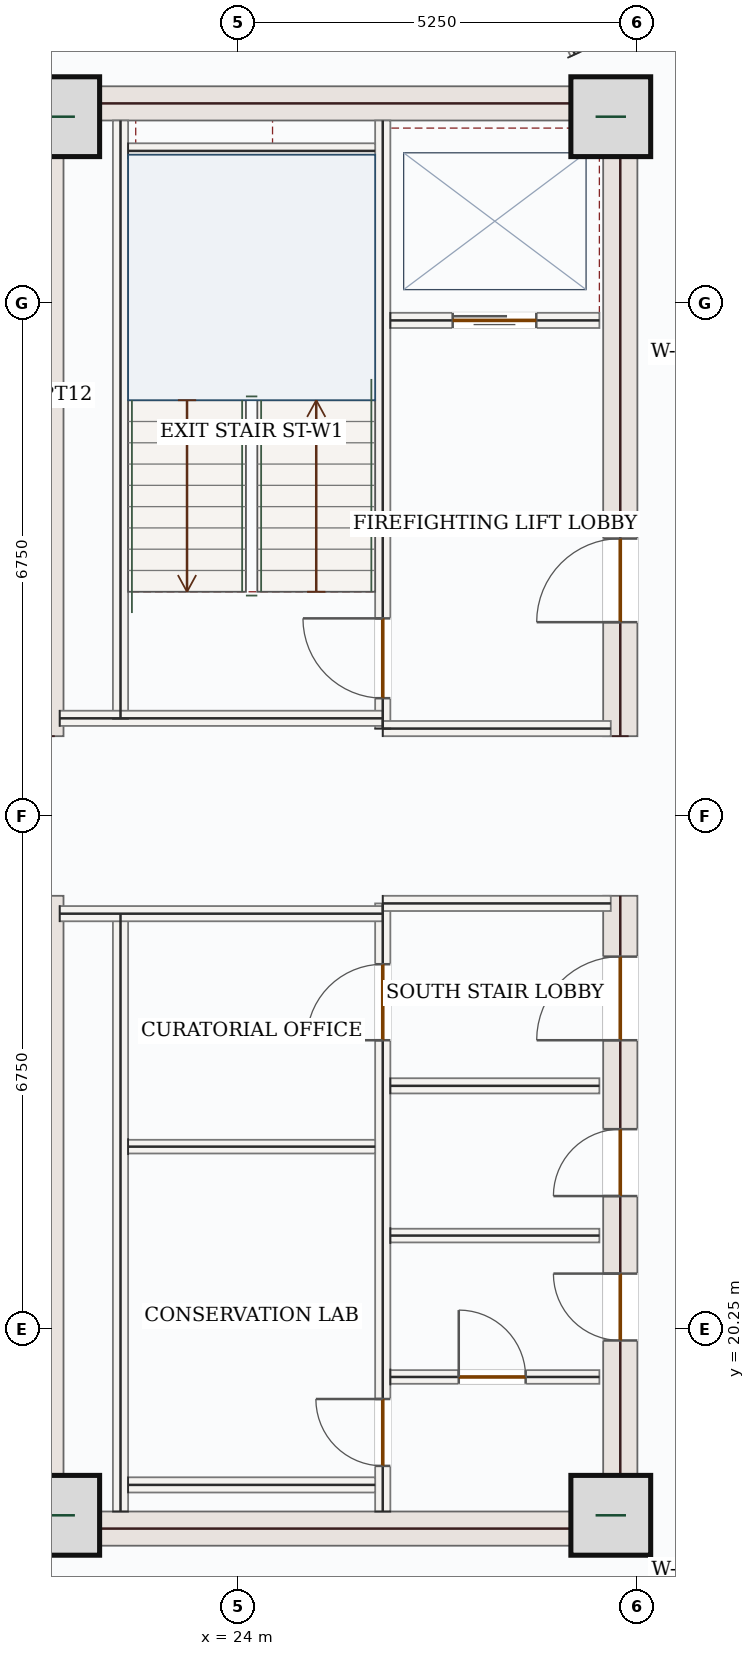
"""IFC4 building model, lengths in metres.
Left out: names, types, materials, properties, quantities, classifications, styles, units other than length and angle.
Written with IfcOpenShell. Run it as: python <this file> out.ifc"""

import sys

from ifc_helpers import new_model, si_unit, direction, frame, frame_2d, origin, origin_2d, place, context, subcontext, project, spatial, rectangle, extrude, source, transform, mapped, element, fill, save


model = new_model("IFC4")
c1 = context("Model", 3, precision=1e-05, world=origin(), true_north=direction((0.0, 1.0)))
c2 = subcontext(c1, "Body", "Model", "MODEL_VIEW")
j1 = project(units=[si_unit("LENGTHUNIT", "METRE"), si_unit("PLANEANGLEUNIT", "RADIAN")], contexts=[c1])
p1 = place(None, origin())
s1 = spatial("IfcSite", under=j1, at=p1, CompositionType="ELEMENT")
p2 = place(p1, origin())
s2 = spatial("IfcBuilding", under=s1, at=p2, CompositionType="ELEMENT")
p3 = place(p2, frame((0.0, 0.0, 239.1)))
s3 = spatial("IfcBuildingStorey", under=s2, at=p3, CompositionType="ELEMENT", Elevation=239.1)
m1 = source(origin(), c2, "Body", "SweptSolid", [
    extrude(rectangle(XDim=8.55, YDim=0.45, at=frame_2d((4.275, 0.0))), origin(), (0.0, 0.0, 1.0), 3.5),
])
for number, where, z_axis, x_axis in (
    (1, (21.475, 17.4, 0.0), (0.0, 0.0, 1.0), (0.0, 1.0, 0.0)),
    (2, (21.475, 28.05, 0.0), (0.0, 0.0, 1.0), (0.0, 1.0, 0.0)),
):
    element("IfcWall", number, at=place(p3, frame(where, z_axis=z_axis, x_axis=x_axis)), inside=s3, PredefinedType="SHEAR", context=c2, shape_type="MappedRepresentation", body=[
        mapped(m1, transform((0.0, 0.0, 0.0), x_axis=(1.0, 0.0, 0.0), y_axis=(0.0, 1.0, 0.0), z_axis=(0.0, 0.0, 1.0), scale=1.0)),
    ])
p4 = place(p3, frame((29.025, 17.4, 0.0), z_axis=(0.0, 0.0, 1.0), x_axis=(0.0, 1.0, 0.0)))
e3 = element("IfcWall", 3, at=p4, inside=s3, PredefinedType="SHEAR", context=c2, shape_type="SweptSolid", body=[
    extrude(rectangle(XDim=8.55, YDim=0.45, at=frame_2d((4.275, 0.0))), origin(), (0.0, 0.0, 1.0), 3.5),
])
p5 = place(p4, frame((6.65, 0.0, 0.0)))
e4 = element("IfcOpeningElement", 4, at=p5, cuts=e3, PredefinedType="OPENING", context=c2, shape_type="SweptSolid", body=[
    extrude(rectangle(XDim=1.1, YDim=2.2, at=frame_2d((0.55, 1.1))), frame((0.0, 0.235, 0.0), z_axis=(0.0, -1.0, 0.0), x_axis=(1.0, 0.0, 0.0)), (0.0, 0.0, 1.0), 0.47),
])
p6 = place(p4, frame((2.7, 0.0, 0.0)))
e5 = element("IfcOpeningElement", 5, at=p6, cuts=e3, PredefinedType="OPENING", context=c2, shape_type="SweptSolid", body=[
    extrude(rectangle(XDim=0.88, YDim=2.1, at=frame_2d((0.44, 1.05))), frame((0.0, 0.235, 0.0), z_axis=(0.0, -1.0, 0.0), x_axis=(1.0, 0.0, 0.0)), (0.0, 0.0, 1.0), 0.47),
])
p7 = place(p4, frame((4.6, 0.0, 0.0)))
e6 = element("IfcOpeningElement", 6, at=p7, cuts=e3, PredefinedType="OPENING", context=c2, shape_type="SweptSolid", body=[
    extrude(rectangle(XDim=0.88, YDim=2.1, at=frame_2d((0.44, 1.05))), frame((0.0, 0.235, 0.0), z_axis=(0.0, -1.0, 0.0), x_axis=(1.0, 0.0, 0.0)), (0.0, 0.0, 1.0), 0.47),
])
p8 = place(p3, frame((29.025, 28.05, 0.0), z_axis=(0.0, 0.0, 1.0), x_axis=(0.0, 1.0, 0.0)))
e7 = element("IfcWall", 7, at=p8, inside=s3, PredefinedType="SHEAR", context=c2, shape_type="SweptSolid", body=[
    extrude(rectangle(XDim=8.55, YDim=0.45, at=frame_2d((4.275, 0.0))), origin(), (0.0, 0.0, 1.0), 3.5),
])
p9 = place(p8, frame((1.5, 0.0, 0.0)))
e8 = element("IfcOpeningElement", 8, at=p9, cuts=e7, PredefinedType="OPENING", context=c2, shape_type="SweptSolid", body=[
    extrude(rectangle(XDim=1.1, YDim=2.2, at=frame_2d((0.55, 1.1))), frame((0.0, 0.235, 0.0), z_axis=(0.0, -1.0, 0.0), x_axis=(1.0, 0.0, 0.0)), (0.0, 0.0, 1.0), 0.47),
])
m2 = source(origin(), c2, "Body", "SweptSolid", [
    extrude(rectangle(XDim=7.1, YDim=0.45, at=frame_2d((3.55, 0.0))), origin(), (0.0, 0.0, 1.0), 3.5),
])
for number, where, z_axis, x_axis in (
    (9, (21.7, 17.625, 0.0), (0.0, 0.0, 1.0), (1.0, 0.0, 0.0)),
    (10, (21.7, 36.375, 0.0), (0.0, 0.0, 1.0), (1.0, 0.0, 0.0)),
):
    element("IfcWall", number, at=place(p3, frame(where, z_axis=z_axis, x_axis=x_axis)), inside=s3, PredefinedType="SHEAR", context=c2, shape_type="MappedRepresentation", body=[
        mapped(m2, transform((0.0, 0.0, 0.0), x_axis=(1.0, 0.0, 0.0), y_axis=(0.0, 1.0, 0.0), z_axis=(0.0, 0.0, 1.0), scale=1.0)),
    ])
m3 = source(origin(), c2, "Body", "SweptSolid", [
    extrude(rectangle(XDim=1.05, YDim=1.05, at=origin_2d()), origin(), (0.0, 0.0, 1.0), 3.75),
])
for number, where, z_axis, x_axis in (
    (11, (21.65, 17.8, 0.0), (0.0, 0.0, 1.0), (1.0, 0.0, 0.0)),
    (12, (28.9, 17.8, 0.0), (0.0, 0.0, 1.0), (1.0, 0.0, 0.0)),
    (13, (21.65, 36.2, 0.0), (0.0, 0.0, 1.0), (1.0, 0.0, 0.0)),
    (14, (28.9, 36.2, 0.0), (0.0, 0.0, 1.0), (1.0, 0.0, 0.0)),
):
    element("IfcColumn", number, at=place(p3, frame(where, z_axis=z_axis, x_axis=x_axis)), inside=s3, PredefinedType="COLUMN", context=c2, shape_type="MappedRepresentation", body=[
        mapped(m3, transform((0.0, 0.0, 0.0), x_axis=(1.0, 0.0, 0.0), y_axis=(0.0, 1.0, 0.0), z_axis=(0.0, 0.0, 1.0), scale=1.0)),
    ])
m4 = source(origin(), c2, "Body", "SweptSolid", [
    extrude(rectangle(XDim=5.258, YDim=0.28, at=frame_2d((2.629, 0.0))), origin(), (0.0, 0.0, 1.0), 3.5),
])
p10 = place(p3, frame((18.94, 35.542, 0.0), z_axis=(0.0, 0.0, 1.0), x_axis=(0.707106781187, 0.707106781187, 0.0)))
e15 = element("IfcWall", 15, at=p10, inside=s3, PredefinedType="SOLIDWALL", context=c2, shape_type="MappedRepresentation", body=[
    mapped(m4, transform((0.0, 0.0, 0.0), x_axis=(1.0, 0.0, 0.0), y_axis=(0.0, 1.0, 0.0), z_axis=(0.0, 0.0, 1.0), scale=1.0)),
])
m5 = source(origin(), c2, "Body", "SweptSolid", [
    extrude(rectangle(XDim=7.87, YDim=0.2, at=frame_2d((3.935, 0.0))), origin(), (0.0, 0.0, 1.0), 3.5),
])
for number, where, z_axis, x_axis in (
    (16, (22.45, 17.85, 0.0), (0.0, 0.0, 1.0), (0.0, 1.0, 0.0)),
    (17, (22.45, 28.28, 0.0), (0.0, 0.0, 1.0), (0.0, 1.0, 0.0)),
):
    element("IfcWall", number, at=place(p3, frame(where, z_axis=z_axis, x_axis=x_axis)), inside=s3, PredefinedType="SOLIDWALL", context=c2, shape_type="MappedRepresentation", body=[
        mapped(m5, transform((0.0, 0.0, 0.0), x_axis=(1.0, 0.0, 0.0), y_axis=(0.0, 1.0, 0.0), z_axis=(0.0, 0.0, 1.0), scale=1.0)),
    ])
p11 = place(p3, frame((25.9, 17.85, 0.0), z_axis=(0.0, 0.0, 1.0), x_axis=(0.0, 1.0, 0.0)))
e18 = element("IfcWall", 18, at=p11, inside=s3, PredefinedType="SOLIDWALL", context=c2, shape_type="SweptSolid", body=[
    extrude(rectangle(XDim=8.0, YDim=0.2, at=frame_2d((4.0, 0.0))), origin(), (0.0, 0.0, 1.0), 3.5),
])
p12 = place(p11, frame((6.2, 0.0, 0.0)))
e19 = element("IfcOpeningElement", 19, at=p12, cuts=e18, PredefinedType="OPENING", context=c2, shape_type="SweptSolid", body=[
    extrude(rectangle(XDim=1.0, YDim=2.15, at=frame_2d((0.5, 1.075))), frame((0.0, 0.11, 0.0), z_axis=(0.0, -1.0, 0.0), x_axis=(1.0, 0.0, 0.0)), (0.0, 0.0, 1.0), 0.22),
])
p13 = place(p11, frame((0.6, 0.0, 0.0)))
e20 = element("IfcOpeningElement", 20, at=p13, cuts=e18, PredefinedType="OPENING", context=c2, shape_type="SweptSolid", body=[
    extrude(rectangle(XDim=0.88, YDim=2.1, at=frame_2d((0.44, 1.05))), frame((0.0, 0.11, 0.0), z_axis=(0.0, -1.0, 0.0), x_axis=(1.0, 0.0, 0.0)), (0.0, 0.0, 1.0), 0.22),
])
p14 = place(p3, frame((25.9, 28.15, 0.0), z_axis=(0.0, 0.0, 1.0), x_axis=(0.0, 1.0, 0.0)))
e21 = element("IfcWall", 21, at=p14, inside=s3, PredefinedType="SOLIDWALL", context=c2, shape_type="SweptSolid", body=[
    extrude(rectangle(XDim=8.0, YDim=0.2, at=frame_2d((4.0, 0.0))), origin(), (0.0, 0.0, 1.0), 3.5),
])
p15 = place(p14, frame((0.4, 0.0, 0.0)))
e22 = element("IfcOpeningElement", 22, at=p15, cuts=e21, PredefinedType="OPENING", context=c2, shape_type="SweptSolid", body=[
    extrude(rectangle(XDim=1.05, YDim=2.15, at=frame_2d((0.525, 1.075))), frame((0.0, 0.11, 0.0), z_axis=(0.0, -1.0, 0.0), x_axis=(1.0, 0.0, 0.0)), (0.0, 0.0, 1.0), 0.22),
])
m6 = source(origin(), c2, "Body", "SweptSolid", [
    extrude(rectangle(XDim=4.25, YDim=0.2, at=frame_2d((2.125, 0.0))), origin(), (0.0, 0.0, 1.0), 3.5),
])
p16 = place(p3, frame((21.65, 25.715, 0.0), z_axis=(0.0, 0.0, 1.0), x_axis=(1.0, 0.0, 0.0)))
e23 = element("IfcWall", 23, at=p16, inside=s3, PredefinedType="SOLIDWALL", context=c2, shape_type="MappedRepresentation", body=[
    mapped(m6, transform((0.0, 0.0, 0.0), x_axis=(1.0, 0.0, 0.0), y_axis=(0.0, 1.0, 0.0), z_axis=(0.0, 0.0, 1.0), scale=1.0)),
])
m7 = source(origin(), c2, "Body", "SweptSolid", [
    extrude(rectangle(XDim=3.0, YDim=0.2, at=frame_2d((1.5, 0.0))), origin(), (0.0, 0.0, 1.0), 3.5),
])
p17 = place(p3, frame((25.9, 25.85, 0.0), z_axis=(0.0, 0.0, 1.0), x_axis=(1.0, 0.0, 0.0)))
e24 = element("IfcWall", 24, at=p17, inside=s3, PredefinedType="SOLIDWALL", context=c2, shape_type="MappedRepresentation", body=[
    mapped(m7, transform((0.0, 0.0, 0.0), x_axis=(1.0, 0.0, 0.0), y_axis=(0.0, 1.0, 0.0), z_axis=(0.0, 0.0, 1.0), scale=1.0)),
])
p18 = place(p3, frame((21.65, 28.285, 0.0), z_axis=(0.0, 0.0, 1.0), x_axis=(1.0, 0.0, 0.0)))
e25 = element("IfcWall", 25, at=p18, inside=s3, PredefinedType="SOLIDWALL", context=c2, shape_type="MappedRepresentation", body=[
    mapped(m6, transform((0.0, 0.0, 0.0), x_axis=(1.0, 0.0, 0.0), y_axis=(0.0, 1.0, 0.0), z_axis=(0.0, 0.0, 1.0), scale=1.0)),
])
p19 = place(p3, frame((25.9, 28.15, 0.0), z_axis=(0.0, 0.0, 1.0), x_axis=(1.0, 0.0, 0.0)))
e26 = element("IfcWall", 26, at=p19, inside=s3, PredefinedType="SOLIDWALL", context=c2, shape_type="MappedRepresentation", body=[
    mapped(m7, transform((0.0, 0.0, 0.0), x_axis=(1.0, 0.0, 0.0), y_axis=(0.0, 1.0, 0.0), z_axis=(0.0, 0.0, 1.0), scale=1.0)),
])
m8 = source(origin(), c2, "Body", "SweptSolid", [
    extrude(rectangle(XDim=3.25, YDim=0.2, at=frame_2d((1.625, 0.0))), origin(), (0.0, 0.0, 1.0), 3.5),
])
for number, where, z_axis, x_axis in (
    (27, (22.55, 35.75, 0.0), (0.0, 0.0, 1.0), (1.0, 0.0, 0.0)),
    (28, (22.55, 18.2, 0.0), (0.0, 0.0, 1.0), (1.0, 0.0, 0.0)),
):
    element("IfcWall", number, at=place(p3, frame(where, z_axis=z_axis, x_axis=x_axis)), inside=s3, PredefinedType="SOLIDWALL", context=c2, shape_type="MappedRepresentation", body=[
        mapped(m8, transform((0.0, 0.0, 0.0), x_axis=(1.0, 0.0, 0.0), y_axis=(0.0, 1.0, 0.0), z_axis=(0.0, 0.0, 1.0), scale=1.0)),
    ])
m9 = source(origin(), c2, "Body", "SweptSolid", [
    extrude(rectangle(XDim=3.25, YDim=0.18, at=frame_2d((1.625, 0.0))), origin(), (0.0, 0.0, 1.0), 3.5),
])
p20 = place(p3, frame((22.55, 22.65, 0.0), z_axis=(0.0, 0.0, 1.0), x_axis=(1.0, 0.0, 0.0)))
e29 = element("IfcWall", 29, at=p20, inside=s3, PredefinedType="PARTITIONING", context=c2, shape_type="MappedRepresentation", body=[
    mapped(m9, transform((0.0, 0.0, 0.0), x_axis=(1.0, 0.0, 0.0), y_axis=(0.0, 1.0, 0.0), z_axis=(0.0, 0.0, 1.0), scale=1.0)),
])
p21 = place(p3, frame((26.0, 33.52, 0.0), z_axis=(0.0, 0.0, 1.0), x_axis=(1.0, 0.0, 0.0)))
e30 = element("IfcWall", 30, at=p21, inside=s3, PredefinedType="SOLIDWALL", context=c2, shape_type="SweptSolid", body=[
    extrude(rectangle(XDim=2.75, YDim=0.2, at=frame_2d((1.375, 0.0))), origin(), (0.0, 0.0, 1.0), 3.5),
])
p22 = place(p21, frame((0.82, 0.0, 0.0)))
e31 = element("IfcOpeningElement", 31, at=p22, cuts=e30, PredefinedType="OPENING", context=c2, shape_type="SweptSolid", body=[
    extrude(rectangle(XDim=1.1, YDim=2.15, at=frame_2d((0.55, 1.075))), frame((0.0, 0.11, 0.0), z_axis=(0.0, -1.0, 0.0), x_axis=(1.0, 0.0, 0.0)), (0.0, 0.0, 1.0), 0.22),
])
m10 = source(origin(), c2, "Body", "SweptSolid", [
    extrude(rectangle(XDim=2.75, YDim=0.2, at=frame_2d((1.375, 0.0))), origin(), (0.0, 0.0, 1.0), 3.5),
])
p23 = place(p3, frame((26.0, 23.45, 0.0), z_axis=(0.0, 0.0, 1.0), x_axis=(1.0, 0.0, 0.0)))
e32 = element("IfcWall", 32, at=p23, inside=s3, PredefinedType="SOLIDWALL", context=c2, shape_type="MappedRepresentation", body=[
    mapped(m10, transform((0.0, 0.0, 0.0), x_axis=(1.0, 0.0, 0.0), y_axis=(0.0, 1.0, 0.0), z_axis=(0.0, 0.0, 1.0), scale=1.0)),
])
p24 = place(p3, frame((26.0, 19.62, 0.0), z_axis=(0.0, 0.0, 1.0), x_axis=(1.0, 0.0, 0.0)))
e33 = element("IfcWall", 33, at=p24, inside=s3, PredefinedType="PARTITIONING", context=c2, shape_type="SweptSolid", body=[
    extrude(rectangle(XDim=2.75, YDim=0.18, at=frame_2d((1.375, 0.0))), origin(), (0.0, 0.0, 1.0), 3.5),
])
p25 = place(p24, frame((0.9, 0.0, 0.0)))
e34 = element("IfcOpeningElement", 34, at=p25, cuts=e33, PredefinedType="OPENING", context=c2, shape_type="SweptSolid", body=[
    extrude(rectangle(XDim=0.88, YDim=2.1, at=frame_2d((0.44, 1.05))), frame((0.0, 0.1, 0.0), z_axis=(0.0, -1.0, 0.0), x_axis=(1.0, 0.0, 0.0)), (0.0, 0.0, 1.0), 0.2),
])
m11 = source(origin(), c2, "Body", "SweptSolid", [
    extrude(rectangle(XDim=2.75, YDim=0.18, at=frame_2d((1.375, 0.0))), origin(), (0.0, 0.0, 1.0), 3.5),
])
p26 = place(p3, frame((26.0, 21.48, 0.0), z_axis=(0.0, 0.0, 1.0), x_axis=(1.0, 0.0, 0.0)))
e35 = element("IfcWall", 35, at=p26, inside=s3, PredefinedType="PARTITIONING", context=c2, shape_type="MappedRepresentation", body=[
    mapped(m11, transform((0.0, 0.0, 0.0), x_axis=(1.0, 0.0, 0.0), y_axis=(0.0, 1.0, 0.0), z_axis=(0.0, 0.0, 1.0), scale=1.0)),
])
m12 = source(origin(), c2, "Body", "SweptSolid", [
    extrude(rectangle(XDim=8.701, YDim=0.125, at=frame_2d((4.351, 0.0))), origin(), (0.0, 0.0, 1.0), 3.5),
])
p27 = place(p3, frame((28.429, 37.02, 0.0), z_axis=(0.0, 0.0, 1.0), x_axis=(-0.419458495046, 0.907774515468, 0.0)))
e36 = element("IfcWall", 36, at=p27, inside=s3, PredefinedType="PARTITIONING", context=c2, shape_type="MappedRepresentation", body=[
    mapped(m12, transform((0.0, 0.0, 0.0), x_axis=(1.0, 0.0, 0.0), y_axis=(0.0, 1.0, 0.0), z_axis=(0.0, 0.0, 1.0), scale=1.0)),
])
m13 = source(origin(), c2, "Body", "SweptSolid", [
    extrude(rectangle(XDim=1.05, YDim=2.15, at=frame_2d((0.525, 1.075))), frame((0.0, 0.025, 0.0), z_axis=(0.0, -1.0, 0.0), x_axis=(1.0, 0.0, 0.0)), (0.0, 0.0, 1.0), 0.05),
])
p28 = place(p15, origin())
e37 = element("IfcDoor", 37, at=p28, inside=s3, OperationType="SINGLE_SWING_RIGHT", PredefinedType="DOOR", context=c2, shape_type="MappedRepresentation", body=[
    mapped(m13, transform((0.0, 0.0, 0.0), x_axis=(1.0, 0.0, 0.0), y_axis=(0.0, 1.0, 0.0), z_axis=(0.0, 0.0, 1.0), scale=1.0)),
])
fill(e22, e37)
m14 = source(origin(), c2, "Body", "SweptSolid", [
    extrude(rectangle(XDim=1.0, YDim=2.15, at=frame_2d((0.5, 1.075))), frame((0.0, 0.025, 0.0), z_axis=(0.0, -1.0, 0.0), x_axis=(1.0, 0.0, 0.0)), (0.0, 0.0, 1.0), 0.05),
])
p29 = place(p12, origin())
e38 = element("IfcDoor", 38, at=p29, inside=s3, OperationType="SINGLE_SWING_LEFT", PredefinedType="DOOR", context=c2, shape_type="MappedRepresentation", body=[
    mapped(m14, transform((0.0, 0.0, 0.0), x_axis=(1.0, 0.0, 0.0), y_axis=(0.0, 1.0, 0.0), z_axis=(0.0, 0.0, 1.0), scale=1.0)),
])
fill(e19, e38)
m15 = source(origin(), c2, "Body", "SweptSolid", [
    extrude(rectangle(XDim=0.88, YDim=2.1, at=frame_2d((0.44, 1.05))), frame((0.0, 0.025, 0.0), z_axis=(0.0, -1.0, 0.0), x_axis=(1.0, 0.0, 0.0)), (0.0, 0.0, 1.0), 0.05),
])
p30 = place(p13, origin())
e39 = element("IfcDoor", 39, at=p30, inside=s3, OperationType="SINGLE_SWING_RIGHT", PredefinedType="DOOR", context=c2, shape_type="MappedRepresentation", body=[
    mapped(m15, transform((0.0, 0.0, 0.0), x_axis=(1.0, 0.0, 0.0), y_axis=(0.0, 1.0, 0.0), z_axis=(0.0, 0.0, 1.0), scale=1.0)),
])
fill(e20, e39)
m16 = source(origin(), c2, "Body", "SweptSolid", [
    extrude(rectangle(XDim=1.1, YDim=2.15, at=frame_2d((0.55, 1.075))), frame((0.0, 0.025, 0.0), z_axis=(0.0, -1.0, 0.0), x_axis=(1.0, 0.0, 0.0)), (0.0, 0.0, 1.0), 0.05),
])
p31 = place(p22, origin())
e40 = element("IfcDoor", 40, at=p31, inside=s3, OperationType="DOUBLE_DOOR_SLIDING", PredefinedType="DOOR", context=c2, shape_type="MappedRepresentation", body=[
    mapped(m16, transform((0.0, 0.0, 0.0), x_axis=(1.0, 0.0, 0.0), y_axis=(0.0, 1.0, 0.0), z_axis=(0.0, 0.0, 1.0), scale=1.0)),
])
fill(e31, e40)
m17 = source(origin(), c2, "Body", "SweptSolid", [
    extrude(rectangle(XDim=1.1, YDim=2.2, at=frame_2d((0.55, 1.1))), frame((0.0, 0.025, 0.0), z_axis=(0.0, -1.0, 0.0), x_axis=(1.0, 0.0, 0.0)), (0.0, 0.0, 1.0), 0.05),
])
p32 = place(p9, origin())
e41 = element("IfcDoor", 41, at=p32, inside=s3, OperationType="SINGLE_SWING_LEFT", PredefinedType="DOOR", context=c2, shape_type="MappedRepresentation", body=[
    mapped(m17, transform((0.0, 0.0, 0.0), x_axis=(1.0, 0.0, 0.0), y_axis=(0.0, 1.0, 0.0), z_axis=(0.0, 0.0, 1.0), scale=1.0)),
])
fill(e8, e41)
p33 = place(p5, origin())
e42 = element("IfcDoor", 42, at=p33, inside=s3, OperationType="SINGLE_SWING_LEFT", PredefinedType="DOOR", context=c2, shape_type="MappedRepresentation", body=[
    mapped(m17, transform((0.0, 0.0, 0.0), x_axis=(1.0, 0.0, 0.0), y_axis=(0.0, 1.0, 0.0), z_axis=(0.0, 0.0, 1.0), scale=1.0)),
])
fill(e4, e42)
p34 = place(p25, origin())
e43 = element("IfcDoor", 43, at=p34, inside=s3, OperationType="SINGLE_SWING_LEFT", PredefinedType="DOOR", context=c2, shape_type="MappedRepresentation", body=[
    mapped(m15, transform((0.0, 0.0, 0.0), x_axis=(1.0, 0.0, 0.0), y_axis=(0.0, 1.0, 0.0), z_axis=(0.0, 0.0, 1.0), scale=1.0)),
])
fill(e34, e43)
p35 = place(p6, origin())
e44 = element("IfcDoor", 44, at=p35, inside=s3, OperationType="SINGLE_SWING_RIGHT", PredefinedType="DOOR", context=c2, shape_type="MappedRepresentation", body=[
    mapped(m15, transform((0.0, 0.0, 0.0), x_axis=(1.0, 0.0, 0.0), y_axis=(0.0, 1.0, 0.0), z_axis=(0.0, 0.0, 1.0), scale=1.0)),
])
fill(e5, e44)
p36 = place(p7, origin())
e45 = element("IfcDoor", 45, at=p36, inside=s3, OperationType="SINGLE_SWING_LEFT", PredefinedType="DOOR", context=c2, shape_type="MappedRepresentation", body=[
    mapped(m15, transform((0.0, 0.0, 0.0), x_axis=(1.0, 0.0, 0.0), y_axis=(0.0, 1.0, 0.0), z_axis=(0.0, 0.0, 1.0), scale=1.0)),
])
fill(e6, e45)
save(model, sys.argv[1])
